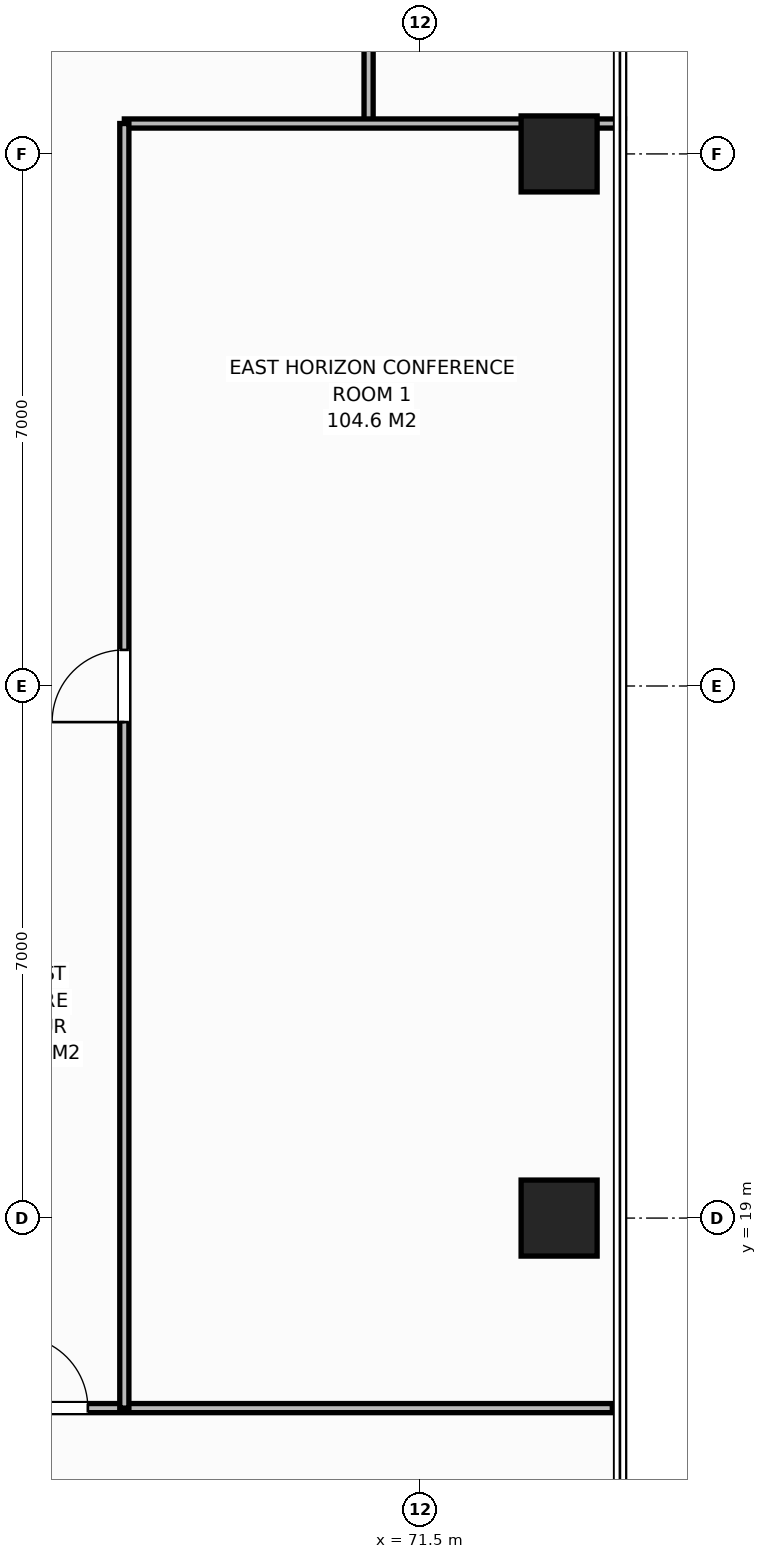
"""IFC4 building model, lengths in metres.
Left out: names, types, materials, properties, quantities, classifications, styles, units other than length and angle.
Written with IfcOpenShell. Run it as: python <this file> out.ifc"""

import sys

from ifc_helpers import new_model, si_unit, direction, frame, frame_2d, origin, origin_2d, place, context, subcontext, project, spatial, rectangle, extrude, element, fill, save


model = new_model("IFC4")
c1 = context("Model", 3, precision=1e-05, world=origin(), true_north=direction((0.0, 1.0)))
c2 = subcontext(c1, "Body", "Model", "MODEL_VIEW")
j1 = project(units=[si_unit("LENGTHUNIT", "METRE"), si_unit("PLANEANGLEUNIT", "RADIAN")], contexts=[c1])
p1 = place(None, origin())
s1 = spatial("IfcSite", under=j1, at=p1, CompositionType="ELEMENT")
p2 = place(p1, origin())
s2 = spatial("IfcBuilding", under=s1, at=p2, CompositionType="ELEMENT")
p3 = place(p2, frame((0.0, 0.0, 189.8)))
s3 = spatial("IfcBuildingStorey", under=s2, at=p3, CompositionType="ELEMENT", Elevation=189.8)
for number, where, z_axis, x_axis in (
    (1, (73.32, 19.0, 0.0), (0.0, 0.0, 1.0), (1.0, 0.0, 0.0)),
    (2, (73.32, 33.0, 0.0), (0.0, 0.0, 1.0), (1.0, 0.0, 0.0)),
):
    element("IfcColumn", number, at=place(p3, frame(where, z_axis=z_axis, x_axis=x_axis)), inside=s3, PredefinedType="COLUMN", context=c2, shape_type="SweptSolid", body=[
        extrude(rectangle(XDim=1.0, YDim=1.0, at=origin_2d()), origin(), (0.0, 0.0, 1.0), 3.8),
    ])
p4 = place(p3, frame((70.813, 33.4, 0.0), z_axis=(0.0, 0.0, 1.0), x_axis=(0.0, 1.0, 0.0)))
e3 = element("IfcWall", 3, at=p4, inside=s3, PredefinedType="PARTITIONING", context=c2, shape_type="SweptSolid", body=[
    extrude(rectangle(XDim=2.1, YDim=0.12, at=frame_2d((1.05, 0.0))), origin(), (0.0, 0.0, 1.0), 3.572),
])
p5 = place(p3, frame((62.93, 16.5, 0.0), z_axis=(0.0, 0.0, 1.0), x_axis=(1.0, 0.0, 0.0)))
e4 = element("IfcWall", 4, at=p5, inside=s3, PredefinedType="PARTITIONING", context=c2, shape_type="SweptSolid", body=[
    extrude(rectangle(XDim=11.09, YDim=0.12, at=frame_2d((5.545, 0.0))), origin(), (0.0, 0.0, 1.0), 3.572),
])
p6 = place(p5, frame((3.24, 0.0, 0.0)))
e5 = element("IfcOpeningElement", 5, at=p6, cuts=e4, PredefinedType="OPENING", context=c2, shape_type="SweptSolid", body=[
    extrude(rectangle(XDim=0.95, YDim=2.15, at=frame_2d((0.475, 1.075))), frame((0.0, 0.07, 0.0), z_axis=(0.0, -1.0, 0.0), x_axis=(1.0, 0.0, 0.0)), (0.0, 0.0, 1.0), 0.14),
])
p7 = place(p3, frame((67.6, 33.4, 0.0), z_axis=(0.0, 0.0, 1.0), x_axis=(1.0, 0.0, 0.0)))
e6 = element("IfcWall", 6, at=p7, inside=s3, PredefinedType="PARTITIONING", context=c2, shape_type="SweptSolid", body=[
    extrude(rectangle(XDim=6.58, YDim=0.12, at=frame_2d((3.29, 0.0))), origin(), (0.0, 0.0, 1.0), 3.572),
])
p8 = place(p3, frame((67.6, 16.5, 0.0), z_axis=(0.0, 0.0, 1.0), x_axis=(0.0, 1.0, 0.0)))
e7 = element("IfcWall", 7, at=p8, inside=s3, PredefinedType="PARTITIONING", context=c2, shape_type="SweptSolid", body=[
    extrude(rectangle(XDim=16.9, YDim=0.12, at=frame_2d((8.45, 0.0))), origin(), (0.0, 0.0, 1.0), 3.572),
])
p9 = place(p8, frame((9.025, 0.0, 0.0)))
e8 = element("IfcOpeningElement", 8, at=p9, cuts=e7, PredefinedType="OPENING", context=c2, shape_type="SweptSolid", body=[
    extrude(rectangle(XDim=0.95, YDim=2.15, at=frame_2d((0.475, 1.075))), frame((0.0, 0.07, 0.0), z_axis=(0.0, -1.0, 0.0), x_axis=(1.0, 0.0, 0.0)), (0.0, 0.0, 1.0), 0.14),
])
p10 = place(p6, origin())
e9 = element("IfcDoor", 9, at=p10, inside=s3, OperationType="SINGLE_SWING_LEFT", PredefinedType="DOOR", context=c2, shape_type="SweptSolid", body=[
    extrude(rectangle(XDim=0.95, YDim=2.15, at=frame_2d((0.475, 1.075))), frame((0.0, 0.025, 0.0), z_axis=(0.0, -1.0, 0.0), x_axis=(1.0, 0.0, 0.0)), (0.0, 0.0, 1.0), 0.05),
])
fill(e5, e9)
p11 = place(p9, origin())
e10 = element("IfcDoor", 10, at=p11, inside=s3, OperationType="SINGLE_SWING_LEFT", PredefinedType="DOOR", context=c2, shape_type="SweptSolid", body=[
    extrude(rectangle(XDim=0.95, YDim=2.15, at=frame_2d((0.475, 1.075))), frame((0.0, 0.025, 0.0), z_axis=(0.0, -1.0, 0.0), x_axis=(1.0, 0.0, 0.0)), (0.0, 0.0, 1.0), 0.05),
])
fill(e8, e10)
save(model, sys.argv[1])
